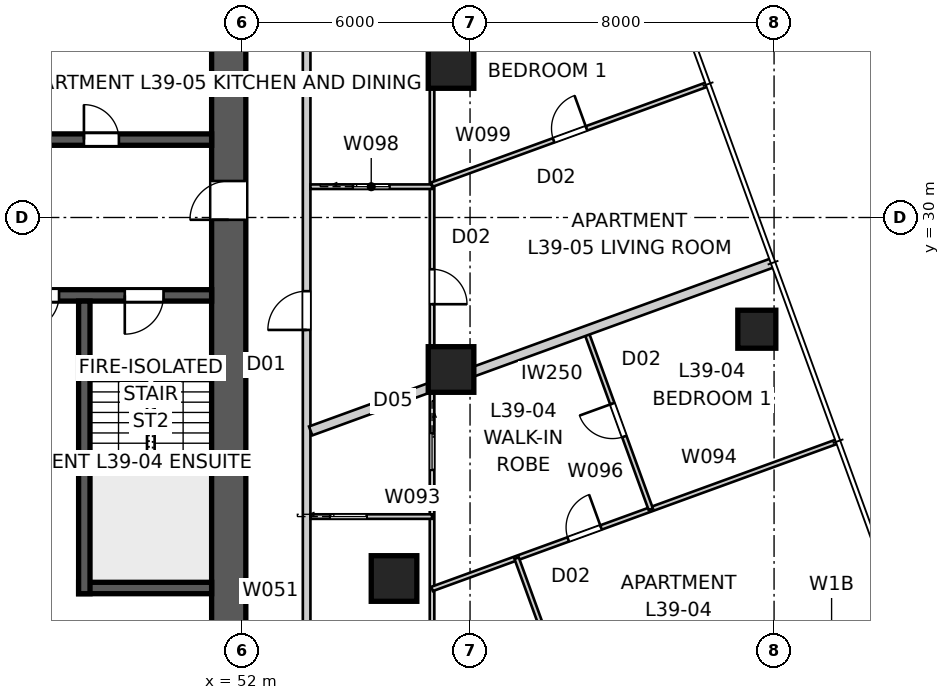
"""IFC4 building model, lengths in metres.
Left out: names, types, materials, properties, quantities, classifications, styles, units other than length and angle.
Written with IfcOpenShell. Run it as: python <this file> out.ifc"""

import sys

from ifc_helpers import new_model, si_unit, direction, frame, frame_2d, origin, origin_2d, place, context, subcontext, project, spatial, polyline, rectangle, outline, extrude, element, fill, save


model = new_model("IFC4")
c1 = context("Model", 3, precision=1e-05, world=origin(), true_north=direction((0.0, 1.0)))
c2 = subcontext(c1, "Body", "Model", "MODEL_VIEW")
j1 = project(units=[si_unit("LENGTHUNIT", "METRE"), si_unit("PLANEANGLEUNIT", "RADIAN")], contexts=[c1])
p1 = place(None, origin())
s1 = spatial("IfcSite", under=j1, at=p1, CompositionType="ELEMENT")
p2 = place(p1, origin())
s2 = spatial("IfcBuilding", under=s1, at=p2, CompositionType="ELEMENT")
p3 = place(p2, frame((0.0, 0.0, 143.8)))
s3 = spatial("IfcBuildingStorey", under=s2, at=p3, CompositionType="ELEMENT", Elevation=143.8)
p4 = place(p3, frame((51.65, 18.8, 0.0), z_axis=(0.0, 0.0, 1.0), x_axis=(0.0, 1.0, 0.0)))
e1 = element("IfcWall", 1, at=p4, inside=s3, PredefinedType="SHEAR", context=c2, shape_type="SweptSolid", body=[
    extrude(outline(polyline([(0.0, -0.45), (22.4, -0.45), (22.4, -0.025), (22.85, -0.025), (22.85, 0.025), (22.4, 0.025), (22.4, 0.45), (0.0, 0.45), (0.0, 0.025), (-0.45, 0.025), (-0.45, -0.025), (0.0, -0.025), (0.0, -0.45)])), origin(), (0.0, 0.0, 1.0), 3.4),
])
p5 = place(p4, frame((11.14, 0.0, 0.0)))
e2 = element("IfcOpeningElement", 2, at=p5, cuts=e1, PredefinedType="OPENING", context=c2, shape_type="SweptSolid", body=[
    extrude(rectangle(XDim=1.02, YDim=2.4, at=frame_2d((0.51, 1.2))), frame((0.0, 0.46, 0.0), z_axis=(0.0, -1.0, 0.0), x_axis=(1.0, 0.0, 0.0)), (0.0, 0.0, 1.0), 0.92),
])
p6 = place(p3, frame((28.8, 32.05, 0.0), z_axis=(0.0, 0.0, 1.0), x_axis=(1.0, 0.0, 0.0)))
e3 = element("IfcWall", 3, at=p6, inside=s3, PredefinedType="SHEAR", context=c2, shape_type="SweptSolid", body=[
    extrude(rectangle(XDim=22.4, YDim=0.3, at=frame_2d((11.2, 0.0))), origin(), (0.0, 0.0, 1.0), 3.4),
])
p7 = place(p6, frame((19.04, 0.0, 0.0)))
e4 = element("IfcOpeningElement", 4, at=p7, cuts=e3, PredefinedType="OPENING", context=c2, shape_type="SweptSolid", body=[
    extrude(rectangle(XDim=0.92, YDim=2.1, at=frame_2d((0.46, 1.05))), frame((0.0, 0.16, 0.0), z_axis=(0.0, -1.0, 0.0), x_axis=(1.0, 0.0, 0.0)), (0.0, 0.0, 1.0), 0.32),
])
p8 = place(p6, frame((1.265, 0.0, 0.0)))
e5 = element("IfcOpeningElement", 5, at=p8, cuts=e3, PredefinedType="OPENING", context=c2, shape_type="SweptSolid", body=[
    extrude(rectangle(XDim=1.02, YDim=2.1, at=frame_2d((0.51, 1.05))), frame((0.0, 0.16, 0.0), z_axis=(0.0, -1.0, 0.0), x_axis=(1.0, 0.0, 0.0)), (0.0, 0.0, 1.0), 0.32),
])
p9 = place(p6, frame((4.015, 0.0, 0.0)))
e6 = element("IfcOpeningElement", 6, at=p9, cuts=e3, PredefinedType="OPENING", context=c2, shape_type="SweptSolid", body=[
    extrude(rectangle(XDim=0.92, YDim=2.1, at=frame_2d((0.46, 1.05))), frame((0.0, 0.16, 0.0), z_axis=(0.0, -1.0, 0.0), x_axis=(1.0, 0.0, 0.0)), (0.0, 0.0, 1.0), 0.32),
])
p10 = place(p6, frame((6.565, 0.0, 0.0)))
e7 = element("IfcOpeningElement", 7, at=p10, cuts=e3, PredefinedType="OPENING", context=c2, shape_type="SweptSolid", body=[
    extrude(rectangle(XDim=0.92, YDim=2.1, at=frame_2d((0.46, 1.05))), frame((0.0, 0.16, 0.0), z_axis=(0.0, -1.0, 0.0), x_axis=(1.0, 0.0, 0.0)), (0.0, 0.0, 1.0), 0.32),
])
p11 = place(p6, frame((8.89, 0.0, 0.0)))
e8 = element("IfcOpeningElement", 8, at=p11, cuts=e3, PredefinedType="OPENING", context=c2, shape_type="SweptSolid", body=[
    extrude(rectangle(XDim=0.92, YDim=2.1, at=frame_2d((0.46, 1.05))), frame((0.0, 0.16, 0.0), z_axis=(0.0, -1.0, 0.0), x_axis=(1.0, 0.0, 0.0)), (0.0, 0.0, 1.0), 0.32),
])
p12 = place(p6, frame((14.85, 0.0, 0.0)))
e9 = element("IfcOpeningElement", 9, at=p12, cuts=e3, PredefinedType="OPENING", context=c2, shape_type="SweptSolid", body=[
    extrude(rectangle(XDim=1.1, YDim=2.1, at=frame_2d((0.55, 1.05))), frame((0.0, 0.16, 0.0), z_axis=(0.0, -1.0, 0.0), x_axis=(1.0, 0.0, 0.0)), (0.0, 0.0, 1.0), 0.32),
])
p13 = place(p3, frame((51.2, 27.95, 0.0), z_axis=(0.0, 0.0, 1.0), x_axis=(-1.0, 0.0, 0.0)))
e10 = element("IfcWall", 10, at=p13, inside=s3, PredefinedType="SHEAR", context=c2, shape_type="SweptSolid", body=[
    extrude(rectangle(XDim=22.4, YDim=0.3, at=frame_2d((11.2, 0.0))), origin(), (0.0, 0.0, 1.0), 3.4),
])
p14 = place(p13, frame((19.04, 0.0, 0.0)))
e11 = element("IfcOpeningElement", 11, at=p14, cuts=e10, PredefinedType="OPENING", context=c2, shape_type="SweptSolid", body=[
    extrude(rectangle(XDim=0.92, YDim=2.1, at=frame_2d((0.46, 1.05))), frame((0.0, 0.16, 0.0), z_axis=(0.0, -1.0, 0.0), x_axis=(1.0, 0.0, 0.0)), (0.0, 0.0, 1.0), 0.32),
])
p15 = place(p13, frame((1.265, 0.0, 0.0)))
e12 = element("IfcOpeningElement", 12, at=p15, cuts=e10, PredefinedType="OPENING", context=c2, shape_type="SweptSolid", body=[
    extrude(rectangle(XDim=1.02, YDim=2.1, at=frame_2d((0.51, 1.05))), frame((0.0, 0.16, 0.0), z_axis=(0.0, -1.0, 0.0), x_axis=(1.0, 0.0, 0.0)), (0.0, 0.0, 1.0), 0.32),
])
p16 = place(p13, frame((4.015, 0.0, 0.0)))
e13 = element("IfcOpeningElement", 13, at=p16, cuts=e10, PredefinedType="OPENING", context=c2, shape_type="SweptSolid", body=[
    extrude(rectangle(XDim=0.92, YDim=2.1, at=frame_2d((0.46, 1.05))), frame((0.0, 0.16, 0.0), z_axis=(0.0, -1.0, 0.0), x_axis=(1.0, 0.0, 0.0)), (0.0, 0.0, 1.0), 0.32),
])
p17 = place(p13, frame((6.45, 0.0, 0.0)))
e14 = element("IfcOpeningElement", 14, at=p17, cuts=e10, PredefinedType="OPENING", context=c2, shape_type="SweptSolid", body=[
    extrude(rectangle(XDim=1.1, YDim=2.1, at=frame_2d((0.55, 1.05))), frame((0.0, 0.16, 0.0), z_axis=(0.0, -1.0, 0.0), x_axis=(1.0, 0.0, 0.0)), (0.0, 0.0, 1.0), 0.32),
])
p18 = place(p13, frame((9.25, 0.0, 0.0)))
e15 = element("IfcOpeningElement", 15, at=p18, cuts=e10, PredefinedType="OPENING", context=c2, shape_type="SweptSolid", body=[
    extrude(rectangle(XDim=1.1, YDim=2.1, at=frame_2d((0.55, 1.05))), frame((0.0, 0.16, 0.0), z_axis=(0.0, -1.0, 0.0), x_axis=(1.0, 0.0, 0.0)), (0.0, 0.0, 1.0), 0.32),
])
p19 = place(p13, frame((14.85, 0.0, 0.0)))
e16 = element("IfcOpeningElement", 16, at=p19, cuts=e10, PredefinedType="OPENING", context=c2, shape_type="SweptSolid", body=[
    extrude(rectangle(XDim=1.1, YDim=2.1, at=frame_2d((0.55, 1.05))), frame((0.0, 0.16, 0.0), z_axis=(0.0, -1.0, 0.0), x_axis=(1.0, 0.0, 0.0)), (0.0, 0.0, 1.0), 0.32),
])
p20 = place(p3, frame((47.85, 27.8, 0.0), z_axis=(0.0, 0.0, 1.0), x_axis=(0.0, -1.0, 0.0)))
e17 = element("IfcWall", 17, at=p20, inside=s3, PredefinedType="SHEAR", context=c2, shape_type="SweptSolid", body=[
    extrude(rectangle(XDim=7.7, YDim=0.3, at=frame_2d((3.85, 0.0))), origin(), (0.0, 0.0, 1.0), 3.4),
])
p21 = place(p3, frame((51.2, 20.25, 0.0), z_axis=(0.0, 0.0, 1.0), x_axis=(-1.0, 0.0, 0.0)))
e18 = element("IfcWall", 18, at=p21, inside=s3, PredefinedType="SHEAR", context=c2, shape_type="SweptSolid", body=[
    extrude(rectangle(XDim=3.5, YDim=0.3, at=frame_2d((1.75, 0.0))), origin(), (0.0, 0.0, 1.0), 3.4),
])
p22 = place(p3, frame((65.546, 27.06, -0.15), z_axis=(0.0, 0.0, 1.0), x_axis=(1.0, 0.0, 0.0)))
e19 = element("IfcColumn", 19, at=p22, inside=s3, PredefinedType="COLUMN", context=c2, shape_type="SweptSolid", body=[
    extrude(rectangle(XDim=1.0, YDim=1.0, at=origin_2d()), origin(), (0.0, 0.0, 1.0), 3.55),
])
for number, where, z_axis, x_axis in (
    (20, (57.5, 26.0, 0.0), (0.0, 0.0, 1.0), (1.0, 0.0, 0.0)),
    (21, (57.5, 34.0, 0.0), (0.0, 0.0, 1.0), (1.0, 0.0, 0.0)),
    (22, (56.0, 20.5, 0.0), (0.0, 0.0, 1.0), (1.0, 0.0, 0.0)),
):
    element("IfcColumn", number, at=place(p3, frame(where, z_axis=z_axis, x_axis=x_axis)), inside=s3, PredefinedType="COLUMN", context=c2, shape_type="SweptSolid", body=[
        extrude(rectangle(XDim=1.2, YDim=1.2, at=origin_2d()), origin(), (0.0, 0.0, 1.0), 3.4),
    ])
p23 = place(p3, frame((68.453, 19.073, 0.0), z_axis=(0.0, 0.0, 1.0), x_axis=(0.939686455819, 0.342037080957, 0.0)))
e23 = element("IfcWall", 23, at=p23, inside=s3, PredefinedType="SOLIDWALL", context=c2, shape_type="SweptSolid", body=[
    extrude(rectangle(XDim=1.0, YDim=0.2, at=frame_2d((0.5, 0.0))), origin(), (0.0, 0.0, 1.0), 3.25),
])
p24 = place(p3, frame((53.7, 13.3, 0.0), z_axis=(0.0, 0.0, 1.0), x_axis=(0.0, 1.0, 0.0)))
e24 = element("IfcWall", 24, at=p24, inside=s3, PredefinedType="PARTITIONING", context=c2, shape_type="SweptSolid", body=[
    extrude(rectangle(XDim=33.0, YDim=0.2, at=frame_2d((16.5, 0.0))), origin(), (0.0, 0.0, 1.0), 3.25),
])
p25 = place(p24, frame((28.411, 0.0, 0.0)))
e25 = element("IfcOpeningElement", 25, at=p25, cuts=e24, PredefinedType="OPENING", context=c2, shape_type="SweptSolid", body=[
    extrude(rectangle(XDim=1.02, YDim=2.1, at=frame_2d((0.51, 1.05))), frame((0.0, 0.11, 0.0), z_axis=(0.0, -1.0, 0.0), x_axis=(1.0, 0.0, 0.0)), (0.0, 0.0, 1.0), 0.22),
])
p26 = place(p24, frame((13.741, 0.0, 0.0)))
e26 = element("IfcOpeningElement", 26, at=p26, cuts=e24, PredefinedType="OPENING", context=c2, shape_type="SweptSolid", body=[
    extrude(rectangle(XDim=1.02, YDim=2.34, at=frame_2d((0.51, 1.17))), frame((0.0, 0.11, 0.0), z_axis=(0.0, -1.0, 0.0), x_axis=(1.0, 0.0, 0.0)), (0.0, 0.0, 1.0), 0.22),
])
p27 = place(p3, frame((65.973, 28.812, 0.0), z_axis=(0.0, 0.0, 1.0), x_axis=(-0.939692090592, -0.342021600019, 0.0)))
e27 = element("IfcWall", 27, at=p27, inside=s3, PredefinedType="PARTITIONING", context=c2, shape_type="SweptSolid", body=[
    extrude(rectangle(XDim=12.949, YDim=0.25, at=frame_2d((6.474, 0.0))), origin(), (0.0, 0.0, 1.0), 3.25),
])
p28 = place(p3, frame((57.0, 48.8, 0.0), z_axis=(0.0, 0.0, 1.0), x_axis=(0.0, -1.0, 0.0)))
e28 = element("IfcWall", 28, at=p28, inside=s3, PredefinedType="PARTITIONING", context=c2, shape_type="SweptSolid", body=[
    extrude(rectangle(XDim=38.113, YDim=0.12, at=frame_2d((19.056, 0.0))), origin(), (0.0, 0.0, 1.0), 2.55),
])
p29 = place(p28, frame((4.198, 0.0, 0.0)))
e29 = element("IfcOpeningElement", 29, at=p29, cuts=e28, PredefinedType="OPENING", context=c2, shape_type="SweptSolid", body=[
    extrude(rectangle(XDim=0.92, YDim=2.34, at=frame_2d((0.46, 1.17))), frame((0.0, 0.07, 0.0), z_axis=(0.0, -1.0, 0.0), x_axis=(1.0, 0.0, 0.0)), (0.0, 0.0, 1.0), 0.14),
])
p30 = place(p28, frame((7.692, 0.0, 0.0)))
e30 = element("IfcOpeningElement", 30, at=p30, cuts=e28, PredefinedType="OPENING", context=c2, shape_type="SweptSolid", body=[
    extrude(rectangle(XDim=0.92, YDim=2.34, at=frame_2d((0.46, 1.17))), frame((0.0, 0.07, 0.0), z_axis=(0.0, -1.0, 0.0), x_axis=(1.0, 0.0, 0.0)), (0.0, 0.0, 1.0), 0.14),
])
p31 = place(p28, frame((20.162, 0.0, 0.0)))
e31 = element("IfcOpeningElement", 31, at=p31, cuts=e28, PredefinedType="OPENING", context=c2, shape_type="SweptSolid", body=[
    extrude(rectangle(XDim=0.92, YDim=2.34, at=frame_2d((0.46, 1.17))), frame((0.0, 0.07, 0.0), z_axis=(0.0, -1.0, 0.0), x_axis=(1.0, 0.0, 0.0)), (0.0, 0.0, 1.0), 0.14),
])
p32 = place(p28, frame((34.056, 0.0, 0.0)))
e32 = element("IfcOpeningElement", 32, at=p32, cuts=e28, PredefinedType="OPENING", context=c2, shape_type="SweptSolid", body=[
    extrude(rectangle(XDim=0.92, YDim=2.34, at=frame_2d((0.46, 1.17))), frame((0.0, 0.07, 0.0), z_axis=(0.0, -1.0, 0.0), x_axis=(1.0, 0.0, 0.0)), (0.0, 0.0, 1.0), 0.14),
])
p33 = place(p28, frame((24.482, 0.0, 0.0)))
e33 = element("IfcOpeningElement", 33, at=p33, cuts=e28, PredefinedType="OPENING", context=c2, shape_type="SweptSolid", body=[
    extrude(rectangle(XDim=0.96, YDim=2.1, at=frame_2d((0.48, 1.05))), frame((0.0, 0.07, 0.0), z_axis=(0.0, -1.0, 0.0), x_axis=(1.0, 0.0, 0.0)), (0.0, 0.0, 1.0), 0.14),
])
p34 = place(p3, frame((53.8, 22.129, 0.0), z_axis=(0.0, 0.0, 1.0), x_axis=(1.0, 0.0, 0.0)))
e34 = element("IfcWall", 34, at=p34, inside=s3, PredefinedType="PARTITIONING", context=c2, shape_type="SweptSolid", body=[
    extrude(rectangle(XDim=3.2, YDim=0.12, at=frame_2d((1.6, 0.0))), origin(), (0.0, 0.0, 1.0), 3.25),
])
p35 = place(p34, frame((0.52, 0.0, 0.0)))
e35 = element("IfcOpeningElement", 35, at=p35, cuts=e34, PredefinedType="OPENING", context=c2, shape_type="SweptSolid", body=[
    extrude(rectangle(XDim=0.96, YDim=2.1, at=frame_2d((0.48, 1.05))), frame((0.0, 0.07, 0.0), z_axis=(0.0, -1.0, 0.0), x_axis=(1.0, 0.0, 0.0)), (0.0, 0.0, 1.0), 0.14),
])
p36 = place(p3, frame((57.0, 20.225, 0.0), z_axis=(0.0, 0.0, 1.0), x_axis=(0.939693965364, 0.342016449105, 0.0)))
e36 = element("IfcWall", 36, at=p36, inside=s3, PredefinedType="PARTITIONING", context=c2, shape_type="SweptSolid", body=[
    extrude(rectangle(XDim=11.328, YDim=0.12, at=frame_2d((5.664, 0.0))), origin(), (0.0, 0.0, 1.0), 3.25),
])
p37 = place(p36, frame((3.812, 0.0, 0.0)))
e37 = element("IfcOpeningElement", 37, at=p37, cuts=e36, PredefinedType="OPENING", context=c2, shape_type="SweptSolid", body=[
    extrude(rectangle(XDim=0.92, YDim=2.34, at=frame_2d((0.46, 1.17))), frame((0.0, 0.07, 0.0), z_axis=(0.0, -1.0, 0.0), x_axis=(1.0, 0.0, 0.0)), (0.0, 0.0, 1.0), 0.14),
])
p38 = place(p3, frame((62.29, 12.615, 0.0), z_axis=(0.0, 0.0, 1.0), x_axis=(-0.342038393654, 0.939685978009, 0.0)))
e38 = element("IfcWall", 38, at=p38, inside=s3, PredefinedType="PARTITIONING", context=c2, shape_type="SweptSolid", body=[
    extrude(rectangle(XDim=8.96, YDim=0.12, at=frame_2d((4.48, 0.0))), origin(), (0.0, 0.0, 1.0), 3.25),
])
p39 = place(p3, frame((62.757, 22.32, 0.0), z_axis=(0.0, 0.0, 1.0), x_axis=(-0.341993964619, 0.939702148643, 0.0)))
e39 = element("IfcWall", 39, at=p39, inside=s3, PredefinedType="PARTITIONING", context=c2, shape_type="SweptSolid", body=[
    extrude(rectangle(XDim=5.0, YDim=0.12, at=frame_2d((2.5, 0.0))), origin(), (0.0, 0.0, 1.0), 3.25),
])
p40 = place(p39, frame((2.04, 0.0, 0.0)))
e40 = element("IfcOpeningElement", 40, at=p40, cuts=e39, PredefinedType="OPENING", context=c2, shape_type="SweptSolid", body=[
    extrude(rectangle(XDim=0.92, YDim=2.34, at=frame_2d((0.46, 1.17))), frame((0.0, 0.07, 0.0), z_axis=(0.0, -1.0, 0.0), x_axis=(1.0, 0.0, 0.0)), (0.0, 0.0, 1.0), 0.14),
])
p41 = place(p3, frame((53.8, 30.81, 0.0), z_axis=(0.0, 0.0, 1.0), x_axis=(1.0, 0.0, 0.0)))
e41 = element("IfcWall", 41, at=p41, inside=s3, PredefinedType="PARTITIONING", context=c2, shape_type="SweptSolid", body=[
    extrude(rectangle(XDim=3.2, YDim=0.12, at=frame_2d((1.6, 0.0))), origin(), (0.0, 0.0, 1.0), 3.25),
])
p42 = place(p41, frame((1.12, 0.0, 0.0)))
e42 = element("IfcOpeningElement", 42, at=p42, cuts=e41, PredefinedType="OPENING", context=c2, shape_type="SweptSolid", body=[
    extrude(rectangle(XDim=0.96, YDim=2.1, at=frame_2d((0.48, 1.05))), frame((0.0, 0.07, 0.0), z_axis=(0.0, -1.0, 0.0), x_axis=(1.0, 0.0, 0.0)), (0.0, 0.0, 1.0), 0.14),
])
p43 = place(p3, frame((57.0, 30.866, 0.0), z_axis=(0.0, 0.0, 1.0), x_axis=(0.939685835373, 0.342038785519, 0.0)))
e43 = element("IfcWall", 43, at=p43, inside=s3, PredefinedType="PARTITIONING", context=c2, shape_type="SweptSolid", body=[
    extrude(rectangle(XDim=7.689, YDim=0.12, at=frame_2d((3.844, 0.0))), origin(), (0.0, 0.0, 1.0), 3.25),
])
p44 = place(p43, frame((3.404, 0.0, 0.0)))
e44 = element("IfcOpeningElement", 44, at=p44, cuts=e43, PredefinedType="OPENING", context=c2, shape_type="SweptSolid", body=[
    extrude(rectangle(XDim=0.92, YDim=2.34, at=frame_2d((0.46, 1.17))), frame((0.0, 0.07, 0.0), z_axis=(0.0, -1.0, 0.0), x_axis=(1.0, 0.0, 0.0)), (0.0, 0.0, 1.0), 0.14),
])
p45 = place(p7, origin())
e45 = element("IfcDoor", 45, at=p45, inside=s3, OperationType="SINGLE_SWING_LEFT", PredefinedType="DOOR", context=c2, shape_type="SweptSolid", body=[
    extrude(rectangle(XDim=0.92, YDim=2.1, at=frame_2d((0.46, 1.05))), frame((0.0, 0.025, 0.0), z_axis=(0.0, -1.0, 0.0), x_axis=(1.0, 0.0, 0.0)), (0.0, 0.0, 1.0), 0.05),
])
fill(e4, e45)
p46 = place(p15, origin())
e46 = element("IfcDoor", 46, at=p46, inside=s3, OperationType="SINGLE_SWING_RIGHT", PredefinedType="DOOR", context=c2, shape_type="SweptSolid", body=[
    extrude(rectangle(XDim=1.02, YDim=2.1, at=frame_2d((0.51, 1.05))), frame((0.0, 0.025, 0.0), z_axis=(0.0, -1.0, 0.0), x_axis=(1.0, 0.0, 0.0)), (0.0, 0.0, 1.0), 0.05),
])
fill(e12, e46)
p47 = place(p16, origin())
e47 = element("IfcDoor", 47, at=p47, inside=s3, OperationType="SINGLE_SWING_RIGHT", PredefinedType="DOOR", context=c2, shape_type="SweptSolid", body=[
    extrude(rectangle(XDim=0.92, YDim=2.1, at=frame_2d((0.46, 1.05))), frame((0.0, 0.025, 0.0), z_axis=(0.0, -1.0, 0.0), x_axis=(1.0, 0.0, 0.0)), (0.0, 0.0, 1.0), 0.05),
])
fill(e13, e47)
p48 = place(p26, origin())
e48 = element("IfcDoor", 48, at=p48, inside=s3, OperationType="SINGLE_SWING_LEFT", PredefinedType="DOOR", context=c2, shape_type="SweptSolid", body=[
    extrude(rectangle(XDim=1.02, YDim=2.34, at=frame_2d((0.51, 1.17))), frame((0.0, 0.025, 0.0), z_axis=(0.0, -1.0, 0.0), x_axis=(1.0, 0.0, 0.0)), (0.0, 0.0, 1.0), 0.05),
])
fill(e26, e48)
p49 = place(p31, origin())
e49 = element("IfcDoor", 49, at=p49, inside=s3, OperationType="SINGLE_SWING_RIGHT", PredefinedType="DOOR", context=c2, shape_type="SweptSolid", body=[
    extrude(rectangle(XDim=0.92, YDim=2.34, at=frame_2d((0.46, 1.17))), frame((0.0, 0.025, 0.0), z_axis=(0.0, -1.0, 0.0), x_axis=(1.0, 0.0, 0.0)), (0.0, 0.0, 1.0), 0.05),
])
fill(e31, e49)
p50 = place(p42, origin())
e50 = element("IfcDoor", 50, at=p50, inside=s3, OperationType="SLIDING_TO_LEFT", PredefinedType="DOOR", context=c2, shape_type="SweptSolid", body=[
    extrude(rectangle(XDim=0.96, YDim=2.1, at=frame_2d((0.48, 1.05))), frame((0.0, 0.025, 0.0), z_axis=(0.0, -1.0, 0.0), x_axis=(1.0, 0.0, 0.0)), (0.0, 0.0, 1.0), 0.05),
])
fill(e42, e50)
p51 = place(p44, origin())
e51 = element("IfcDoor", 51, at=p51, inside=s3, OperationType="SINGLE_SWING_RIGHT", PredefinedType="DOOR", context=c2, shape_type="SweptSolid", body=[
    extrude(rectangle(XDim=0.92, YDim=2.34, at=frame_2d((0.46, 1.17))), frame((0.0, 0.025, 0.0), z_axis=(0.0, -1.0, 0.0), x_axis=(1.0, 0.0, 0.0)), (0.0, 0.0, 1.0), 0.05),
])
fill(e44, e51)
p52 = place(p35, origin())
e52 = element("IfcDoor", 52, at=p52, inside=s3, OperationType="SLIDING_TO_LEFT", PredefinedType="DOOR", context=c2, shape_type="SweptSolid", body=[
    extrude(rectangle(XDim=0.96, YDim=2.1, at=frame_2d((0.48, 1.05))), frame((0.0, 0.025, 0.0), z_axis=(0.0, -1.0, 0.0), x_axis=(1.0, 0.0, 0.0)), (0.0, 0.0, 1.0), 0.05),
])
fill(e35, e52)
p53 = place(p33, origin())
e53 = element("IfcDoor", 53, at=p53, inside=s3, OperationType="SLIDING_TO_LEFT", PredefinedType="DOOR", context=c2, shape_type="SweptSolid", body=[
    extrude(rectangle(XDim=0.96, YDim=2.1, at=frame_2d((0.48, 1.05))), frame((0.0, 0.025, 0.0), z_axis=(0.0, -1.0, 0.0), x_axis=(1.0, 0.0, 0.0)), (0.0, 0.0, 1.0), 0.05),
])
fill(e33, e53)
p54 = place(p40, origin())
e54 = element("IfcDoor", 54, at=p54, inside=s3, OperationType="SINGLE_SWING_RIGHT", PredefinedType="DOOR", context=c2, shape_type="SweptSolid", body=[
    extrude(rectangle(XDim=0.92, YDim=2.34, at=frame_2d((0.46, 1.17))), frame((0.0, 0.025, 0.0), z_axis=(0.0, -1.0, 0.0), x_axis=(1.0, 0.0, 0.0)), (0.0, 0.0, 1.0), 0.05),
])
fill(e40, e54)
p55 = place(p37, origin())
e55 = element("IfcDoor", 55, at=p55, inside=s3, OperationType="SINGLE_SWING_RIGHT", PredefinedType="DOOR", context=c2, shape_type="SweptSolid", body=[
    extrude(rectangle(XDim=0.92, YDim=2.34, at=frame_2d((0.46, 1.17))), frame((0.0, 0.025, 0.0), z_axis=(0.0, -1.0, 0.0), x_axis=(1.0, 0.0, 0.0)), (0.0, 0.0, 1.0), 0.05),
])
fill(e37, e55)
p56 = place(p5, origin())
e56 = element("IfcDoor", 56, at=p56, inside=s3, OperationType="SINGLE_SWING_LEFT", PredefinedType="DOOR", context=c2, shape_type="SweptSolid", body=[
    extrude(rectangle(XDim=1.02, YDim=2.4, at=frame_2d((0.51, 1.2))), frame((0.0, 0.025, 0.0), z_axis=(0.0, -1.0, 0.0), x_axis=(1.0, 0.0, 0.0)), (0.0, 0.0, 1.0), 0.05),
])
fill(e2, e56)
save(model, sys.argv[1])
